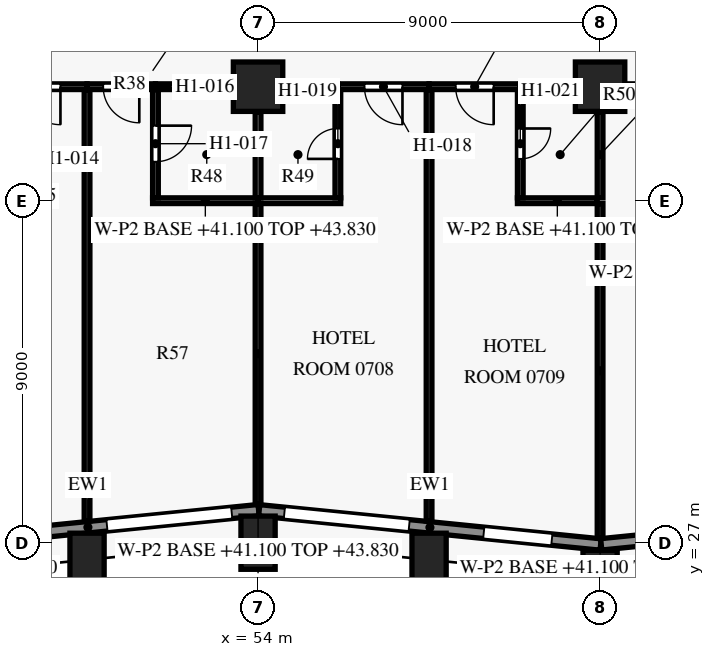
"""IFC4 building model, lengths in metres.
Left out: names, types, materials, properties, quantities, classifications, styles, units other than length and angle.
Written with IfcOpenShell. Run it as: python <this file> out.ifc"""

import sys

from ifc_helpers import new_model, si_unit, direction, frame, frame_2d, origin, origin_2d, place, context, subcontext, project, spatial, rectangle, extrude, element, fill, save


model = new_model("IFC4")
c1 = context("Model", 3, precision=1e-05, world=origin(), true_north=direction((0.0, 1.0)))
c2 = subcontext(c1, "Body", "Model", "MODEL_VIEW")
j1 = project(units=[si_unit("LENGTHUNIT", "METRE"), si_unit("PLANEANGLEUNIT", "RADIAN")], contexts=[c1])
p1 = place(None, origin())
s1 = spatial("IfcSite", under=j1, at=p1, CompositionType="ELEMENT")
p2 = place(p1, origin())
s2 = spatial("IfcBuilding", under=s1, at=p2, CompositionType="ELEMENT")
p3 = place(p2, frame((0.0, 0.0, 41.1)))
s3 = spatial("IfcBuildingStorey", under=s2, at=p3, CompositionType="ELEMENT", Elevation=41.1)
for number, where, z_axis, x_axis in (
    (1, (49.5, 26.55, 0.0), (0.0, 0.0, 1.0), (0.995, 0.1, 0.0)),
    (2, (54.0, 27.0, 0.0), (0.0, 0.0, 1.0), (1.0, 0.0, 0.0)),
    (3, (58.5, 26.55, 0.0), (0.0, 0.0, 1.0), (0.995, -0.1, 0.0)),
    (4, (63.0, 26.1, 0.0), (0.0, 0.0, 1.0), (1.0, 0.0, 0.0)),
):
    element("IfcColumn", number, at=place(p3, frame(where, z_axis=z_axis, x_axis=x_axis)), inside=s3, PredefinedType="COLUMN", context=c2, shape_type="SweptSolid", body=[
        extrude(rectangle(XDim=0.9, YDim=1.4, at=origin_2d()), origin(), (0.0, 0.0, 1.0), 3.6),
    ])
for number, where, z_axis, x_axis in (
    (5, (54.0, 39.0, 0.0), (0.0, 0.0, 1.0), (1.0, 0.0, 0.0)),
    (6, (63.0, 39.0, 0.0), (0.0, 0.0, 1.0), (1.0, 0.0, 0.0)),
):
    element("IfcColumn", number, at=place(p3, frame(where, z_axis=z_axis, x_axis=x_axis)), inside=s3, PredefinedType="COLUMN", context=c2, shape_type="SweptSolid", body=[
        extrude(rectangle(XDim=1.3, YDim=1.3, at=origin_2d()), origin(), (0.0, 0.0, 1.0), 3.6),
    ])
p4 = place(p3, frame((54.015, 27.856, 0.0), z_axis=(0.0, 0.0, 1.0), x_axis=(-0.995037993253, -0.099495688264, 0.0)))
e7 = element("IfcWall", 7, at=p4, inside=s3, PredefinedType="SOLIDWALL", context=c2, shape_type="SweptSolid", body=[
    extrude(rectangle(XDim=9.03, YDim=0.3, at=frame_2d((4.515, 0.0))), origin(), (0.0, 0.0, 1.0), 2.95),
])
p5 = place(p4, frame((0.711, 0.0, 0.15)))
e8 = element("IfcOpeningElement", 8, at=p5, cuts=e7, PredefinedType="OPENING", context=c2, shape_type="SweptSolid", body=[
    extrude(rectangle(XDim=3.3, YDim=2.4, at=frame_2d((1.65, 1.2))), frame((0.0, 0.16, 0.0), z_axis=(0.0, -1.0, 0.0), x_axis=(1.0, 0.0, 0.0)), (0.0, 0.0, 1.0), 0.32),
])
p6 = place(p4, frame((5.984, 0.0, 0.75)))
e9 = element("IfcOpeningElement", 9, at=p6, cuts=e7, PredefinedType="OPENING", context=c2, shape_type="SweptSolid", body=[
    extrude(rectangle(XDim=1.8, YDim=1.8, at=frame_2d((0.9, 0.9))), frame((0.0, 0.16, 0.0), z_axis=(0.0, -1.0, 0.0), x_axis=(1.0, 0.0, 0.0)), (0.0, 0.0, 1.0), 0.32),
])
p7 = place(p3, frame((63.015, 26.953, 0.0), z_axis=(0.0, 0.0, 1.0), x_axis=(-0.995035316196, 0.099522457379, 0.0)))
e10 = element("IfcWall", 10, at=p7, inside=s3, PredefinedType="SOLIDWALL", context=c2, shape_type="SweptSolid", body=[
    extrude(rectangle(XDim=9.03, YDim=0.3, at=frame_2d((4.515, 0.0))), origin(), (0.0, 0.0, 1.0), 2.95),
])
p8 = place(p7, frame((1.291, 0.0, 0.75)))
e11 = element("IfcOpeningElement", 11, at=p8, cuts=e10, PredefinedType="OPENING", context=c2, shape_type="SweptSolid", body=[
    extrude(rectangle(XDim=1.8, YDim=1.8, at=frame_2d((0.9, 0.9))), frame((0.0, 0.16, 0.0), z_axis=(0.0, -1.0, 0.0), x_axis=(1.0, 0.0, 0.0)), (0.0, 0.0, 1.0), 0.32),
])
p9 = place(p7, frame((5.064, 0.0, 0.15)))
e12 = element("IfcOpeningElement", 12, at=p9, cuts=e10, PredefinedType="OPENING", context=c2, shape_type="SweptSolid", body=[
    extrude(rectangle(XDim=3.3, YDim=2.4, at=frame_2d((1.65, 1.2))), frame((0.0, 0.16, 0.0), z_axis=(0.0, -1.0, 0.0), x_axis=(1.0, 0.0, 0.0)), (0.0, 0.0, 1.0), 0.32),
])
p10 = place(p3, frame((66.785, 27.333, 0.0), z_axis=(0.0, 0.0, 1.0), x_axis=(-0.995038471088, -0.099490909409, 0.0)))
e13 = element("IfcWall", 13, at=p10, inside=s3, PredefinedType="SOLIDWALL", context=c2, shape_type="SweptSolid", body=[
    extrude(rectangle(XDim=3.774, YDim=0.3, at=frame_2d((1.887, 0.0))), origin(), (0.0, 0.0, 1.0), 2.95),
])
p11 = place(p10, frame((0.728, 0.0, 0.75)))
e14 = element("IfcOpeningElement", 14, at=p11, cuts=e13, PredefinedType="OPENING", context=c2, shape_type="SweptSolid", body=[
    extrude(rectangle(XDim=1.8, YDim=1.8, at=frame_2d((0.9, 0.9))), frame((0.0, 0.16, 0.0), z_axis=(0.0, -1.0, 0.0), x_axis=(1.0, 0.0, 0.0)), (0.0, 0.0, 1.0), 0.32),
])
p12 = place(p3, frame((54.0, 35.925, 0.0), z_axis=(0.0, 0.0, 1.0), x_axis=(0.0, -1.0, 0.0)))
e15 = element("IfcWall", 15, at=p12, inside=s3, PredefinedType="PARTITIONING", context=c2, shape_type="SweptSolid", body=[
    extrude(rectangle(XDim=7.9, YDim=0.15, at=frame_2d((3.95, 0.0))), origin(), (0.0, 0.0, 1.0), 2.73),
])
p13 = place(p3, frame((63.0, 35.925, 0.0), z_axis=(0.0, 0.0, 1.0), x_axis=(0.0, -1.0, 0.0)))
e16 = element("IfcWall", 16, at=p13, inside=s3, PredefinedType="PARTITIONING", context=c2, shape_type="SweptSolid", body=[
    extrude(rectangle(XDim=8.8, YDim=0.15, at=frame_2d((4.4, 0.0))), origin(), (0.0, 0.0, 1.0), 2.73),
])
p14 = place(p3, frame((51.225, 36.0, 0.0), z_axis=(0.0, 0.0, 1.0), x_axis=(1.0, 0.0, 0.0)))
e17 = element("IfcWall", 17, at=p14, inside=s3, PredefinedType="PARTITIONING", context=c2, shape_type="SweptSolid", body=[
    extrude(rectangle(XDim=2.775, YDim=0.15, at=frame_2d((1.387, 0.0))), origin(), (0.0, 0.0, 1.0), 2.73),
])
p15 = place(p3, frame((54.0, 36.0, 0.0), z_axis=(0.0, 0.0, 1.0), x_axis=(1.0, 0.0, 0.0)))
e18 = element("IfcWall", 18, at=p15, inside=s3, PredefinedType="PARTITIONING", context=c2, shape_type="SweptSolid", body=[
    extrude(rectangle(XDim=2.175, YDim=0.15, at=frame_2d((1.087, 0.0))), origin(), (0.0, 0.0, 1.0), 2.73),
])
p16 = place(p3, frame((60.825, 36.0, 0.0), z_axis=(0.0, 0.0, 1.0), x_axis=(1.0, 0.0, 0.0)))
e19 = element("IfcWall", 19, at=p16, inside=s3, PredefinedType="PARTITIONING", context=c2, shape_type="SweptSolid", body=[
    extrude(rectangle(XDim=2.1, YDim=0.15, at=frame_2d((1.05, 0.0))), origin(), (0.0, 0.0, 1.0), 2.73),
])
p17 = place(p3, frame((56.1, 36.075, 0.0), z_axis=(0.0, 0.0, 1.0), x_axis=(0.0, 1.0, 0.0)))
e20 = element("IfcWall", 20, at=p17, inside=s3, PredefinedType="PARTITIONING", context=c2, shape_type="SweptSolid", body=[
    extrude(rectangle(XDim=2.85, YDim=0.15, at=frame_2d((1.425, 0.0))), origin(), (0.0, 0.0, 1.0), 2.58),
])
p18 = place(p17, frame((1.025, 0.0, 0.0)))
e21 = element("IfcOpeningElement", 21, at=p18, cuts=e20, PredefinedType="OPENING", context=c2, shape_type="SweptSolid", body=[
    extrude(rectangle(XDim=0.8, YDim=2.1, at=frame_2d((0.4, 1.05))), frame((0.0, 0.085, 0.0), z_axis=(0.0, -1.0, 0.0), x_axis=(1.0, 0.0, 0.0)), (0.0, 0.0, 1.0), 0.17),
])
for number, where, z_axis, x_axis in (
    (22, (54.0, 38.345, 0.0), (0.0, 0.0, 1.0), (0.0, -1.0, 0.0)),
    (23, (63.0, 38.345, 0.0), (0.0, 0.0, 1.0), (0.0, -1.0, 0.0)),
):
    element("IfcWall", number, at=place(p3, frame(where, z_axis=z_axis, x_axis=x_axis)), inside=s3, PredefinedType="PARTITIONING", context=c2, shape_type="SweptSolid", body=[
        extrude(rectangle(XDim=2.27, YDim=0.15, at=frame_2d((1.135, 0.0))), origin(), (0.0, 0.0, 1.0), 2.73),
    ])
p19 = place(p3, frame((49.5, 38.925, 0.0), z_axis=(0.0, 0.0, 1.0), x_axis=(0.0, -1.0, 0.0)))
e24 = element("IfcWall", 24, at=p19, inside=s3, PredefinedType="PARTITIONING", context=c2, shape_type="SweptSolid", body=[
    extrude(rectangle(XDim=11.35, YDim=0.15, at=frame_2d((5.675, 0.0))), origin(), (0.0, 0.0, 1.0), 2.58),
])
p20 = place(p3, frame((51.3, 38.925, 0.0), z_axis=(0.0, 0.0, 1.0), x_axis=(0.0, -1.0, 0.0)))
e25 = element("IfcWall", 25, at=p20, inside=s3, PredefinedType="PARTITIONING", context=c2, shape_type="SweptSolid", body=[
    extrude(rectangle(XDim=2.85, YDim=0.15, at=frame_2d((1.425, 0.0))), origin(), (0.0, 0.0, 1.0), 2.58),
])
p21 = place(p20, frame((0.95, 0.0, 0.0)))
e26 = element("IfcOpeningElement", 26, at=p21, cuts=e25, PredefinedType="OPENING", context=c2, shape_type="SweptSolid", body=[
    extrude(rectangle(XDim=0.95, YDim=2.1, at=frame_2d((0.475, 1.05))), frame((0.0, 0.085, 0.0), z_axis=(0.0, -1.0, 0.0), x_axis=(1.0, 0.0, 0.0)), (0.0, 0.0, 1.0), 0.17),
])
p22 = place(p3, frame((58.5, 38.925, 0.0), z_axis=(0.0, 0.0, 1.0), x_axis=(0.0, -1.0, 0.0)))
e27 = element("IfcWall", 27, at=p22, inside=s3, PredefinedType="PARTITIONING", context=c2, shape_type="SweptSolid", body=[
    extrude(rectangle(XDim=11.35, YDim=0.15, at=frame_2d((5.675, 0.0))), origin(), (0.0, 0.0, 1.0), 2.58),
])
p23 = place(p3, frame((60.9, 38.925, 0.0), z_axis=(0.0, 0.0, 1.0), x_axis=(0.0, -1.0, 0.0)))
e28 = element("IfcWall", 28, at=p23, inside=s3, PredefinedType="PARTITIONING", context=c2, shape_type="SweptSolid", body=[
    extrude(rectangle(XDim=2.85, YDim=0.15, at=frame_2d((1.425, 0.0))), origin(), (0.0, 0.0, 1.0), 2.58),
])
p24 = place(p23, frame((1.025, 0.0, 0.0)))
e29 = element("IfcOpeningElement", 29, at=p24, cuts=e28, PredefinedType="OPENING", context=c2, shape_type="SweptSolid", body=[
    extrude(rectangle(XDim=0.8, YDim=2.1, at=frame_2d((0.4, 1.05))), frame((0.0, 0.085, 0.0), z_axis=(0.0, -1.0, 0.0), x_axis=(1.0, 0.0, 0.0)), (0.0, 0.0, 1.0), 0.17),
])
p25 = place(p3, frame((49.5, 39.0, 0.0), z_axis=(0.0, 0.0, 1.0), x_axis=(-1.0, 0.0, 0.0)))
e30 = element("IfcWall", 30, at=p25, inside=s3, PredefinedType="PARTITIONING", context=c2, shape_type="SweptSolid", body=[
    extrude(rectangle(XDim=2.4, YDim=0.15, at=frame_2d((1.2, 0.0))), origin(), (0.0, 0.0, 1.0), 2.58),
])
p26 = place(p25, frame((0.7, 0.0, 0.0)))
e31 = element("IfcOpeningElement", 31, at=p26, cuts=e30, PredefinedType="OPENING", context=c2, shape_type="SweptSolid", body=[
    extrude(rectangle(XDim=1.0, YDim=2.1, at=frame_2d((0.5, 1.05))), frame((0.0, 0.085, 0.0), z_axis=(0.0, -1.0, 0.0), x_axis=(1.0, 0.0, 0.0)), (0.0, 0.0, 1.0), 0.17),
])
p27 = place(p3, frame((51.3, 39.0, 0.0), z_axis=(0.0, 0.0, 1.0), x_axis=(-1.0, 0.0, 0.0)))
e32 = element("IfcWall", 32, at=p27, inside=s3, PredefinedType="PARTITIONING", context=c2, shape_type="SweptSolid", body=[
    extrude(rectangle(XDim=1.8, YDim=0.15, at=frame_2d((0.9, 0.0))), origin(), (0.0, 0.0, 1.0), 2.58),
])
p28 = place(p27, frame((0.425, 0.0, 0.0)))
e33 = element("IfcOpeningElement", 33, at=p28, cuts=e32, PredefinedType="OPENING", context=c2, shape_type="SweptSolid", body=[
    extrude(rectangle(XDim=0.95, YDim=2.1, at=frame_2d((0.475, 1.05))), frame((0.0, 0.085, 0.0), z_axis=(0.0, -1.0, 0.0), x_axis=(1.0, 0.0, 0.0)), (0.0, 0.0, 1.0), 0.17),
])
p29 = place(p3, frame((53.345, 39.0, 0.0), z_axis=(0.0, 0.0, 1.0), x_axis=(-1.0, 0.0, 0.0)))
e34 = element("IfcWall", 34, at=p29, inside=s3, PredefinedType="PARTITIONING", context=c2, shape_type="SweptSolid", body=[
    extrude(rectangle(XDim=2.045, YDim=0.15, at=frame_2d((1.022, 0.0))), origin(), (0.0, 0.0, 1.0), 2.58),
])
p30 = place(p3, frame((56.1, 39.0, 0.0), z_axis=(0.0, 0.0, 1.0), x_axis=(-1.0, 0.0, 0.0)))
e35 = element("IfcWall", 35, at=p30, inside=s3, PredefinedType="PARTITIONING", context=c2, shape_type="SweptSolid", body=[
    extrude(rectangle(XDim=1.445, YDim=0.15, at=frame_2d((0.723, 0.0))), origin(), (0.0, 0.0, 1.0), 2.58),
])
p31 = place(p3, frame((58.5, 39.0, 0.0), z_axis=(0.0, 0.0, 1.0), x_axis=(-1.0, 0.0, 0.0)))
e36 = element("IfcWall", 36, at=p31, inside=s3, PredefinedType="PARTITIONING", context=c2, shape_type="SweptSolid", body=[
    extrude(rectangle(XDim=2.4, YDim=0.15, at=frame_2d((1.2, 0.0))), origin(), (0.0, 0.0, 1.0), 2.58),
])
p32 = place(p31, frame((0.7, 0.0, 0.0)))
e37 = element("IfcOpeningElement", 37, at=p32, cuts=e36, PredefinedType="OPENING", context=c2, shape_type="SweptSolid", body=[
    extrude(rectangle(XDim=1.0, YDim=2.1, at=frame_2d((0.5, 1.05))), frame((0.0, 0.085, 0.0), z_axis=(0.0, -1.0, 0.0), x_axis=(1.0, 0.0, 0.0)), (0.0, 0.0, 1.0), 0.17),
])
p33 = place(p3, frame((60.9, 39.0, 0.0), z_axis=(0.0, 0.0, 1.0), x_axis=(-1.0, 0.0, 0.0)))
e38 = element("IfcWall", 38, at=p33, inside=s3, PredefinedType="PARTITIONING", context=c2, shape_type="SweptSolid", body=[
    extrude(rectangle(XDim=2.4, YDim=0.15, at=frame_2d((1.2, 0.0))), origin(), (0.0, 0.0, 1.0), 2.58),
])
p34 = place(p33, frame((0.7, 0.0, 0.0)))
e39 = element("IfcOpeningElement", 39, at=p34, cuts=e38, PredefinedType="OPENING", context=c2, shape_type="SweptSolid", body=[
    extrude(rectangle(XDim=1.0, YDim=2.1, at=frame_2d((0.5, 1.05))), frame((0.0, 0.085, 0.0), z_axis=(0.0, -1.0, 0.0), x_axis=(1.0, 0.0, 0.0)), (0.0, 0.0, 1.0), 0.17),
])
p35 = place(p3, frame((62.345, 39.0, 0.0), z_axis=(0.0, 0.0, 1.0), x_axis=(-1.0, 0.0, 0.0)))
e40 = element("IfcWall", 40, at=p35, inside=s3, PredefinedType="PARTITIONING", context=c2, shape_type="SweptSolid", body=[
    extrude(rectangle(XDim=1.445, YDim=0.15, at=frame_2d((0.723, 0.0))), origin(), (0.0, 0.0, 1.0), 2.58),
])
p36 = place(p3, frame((64.875, 39.0, 0.0), z_axis=(0.0, 0.0, 1.0), x_axis=(-1.0, 0.0, 0.0)))
e41 = element("IfcWall", 41, at=p36, inside=s3, PredefinedType="PARTITIONING", context=c2, shape_type="SweptSolid", body=[
    extrude(rectangle(XDim=1.22, YDim=0.15, at=frame_2d((0.61, 0.0))), origin(), (0.0, 0.0, 1.0), 2.58),
])
p37 = place(p5, origin())
e42 = element("IfcWindow", 42, at=p37, inside=s3, PartitioningType="SINGLE_PANEL", PredefinedType="WINDOW", context=c2, shape_type="SweptSolid", body=[
    extrude(rectangle(XDim=3.3, YDim=2.4, at=frame_2d((1.65, 1.2))), frame((0.0, 0.03, 0.0), z_axis=(0.0, -1.0, 0.0), x_axis=(1.0, 0.0, 0.0)), (0.0, 0.0, 1.0), 0.06),
])
fill(e8, e42)
p38 = place(p8, origin())
e43 = element("IfcWindow", 43, at=p38, inside=s3, PartitioningType="SINGLE_PANEL", PredefinedType="WINDOW", context=c2, shape_type="SweptSolid", body=[
    extrude(rectangle(XDim=1.8, YDim=1.8, at=frame_2d((0.9, 0.9))), frame((0.0, 0.03, 0.0), z_axis=(0.0, -1.0, 0.0), x_axis=(1.0, 0.0, 0.0)), (0.0, 0.0, 1.0), 0.06),
])
fill(e11, e43)
p39 = place(p9, origin())
e44 = element("IfcWindow", 44, at=p39, inside=s3, PartitioningType="SINGLE_PANEL", PredefinedType="WINDOW", context=c2, shape_type="SweptSolid", body=[
    extrude(rectangle(XDim=3.3, YDim=2.4, at=frame_2d((1.65, 1.2))), frame((0.0, 0.03, 0.0), z_axis=(0.0, -1.0, 0.0), x_axis=(1.0, 0.0, 0.0)), (0.0, 0.0, 1.0), 0.06),
])
fill(e12, e44)
p40 = place(p26, origin())
e45 = element("IfcDoor", 45, at=p40, inside=s3, OperationType="SINGLE_SWING_LEFT", PredefinedType="DOOR", context=c2, shape_type="SweptSolid", body=[
    extrude(rectangle(XDim=1.0, YDim=2.1, at=frame_2d((0.5, 1.05))), frame((0.0, 0.025, 0.0), z_axis=(0.0, -1.0, 0.0), x_axis=(1.0, 0.0, 0.0)), (0.0, 0.0, 1.0), 0.05),
])
fill(e31, e45)
p41 = place(p28, origin())
e46 = element("IfcDoor", 46, at=p41, inside=s3, OperationType="SINGLE_SWING_LEFT", PredefinedType="DOOR", context=c2, shape_type="SweptSolid", body=[
    extrude(rectangle(XDim=0.95, YDim=2.1, at=frame_2d((0.475, 1.05))), frame((0.0, 0.025, 0.0), z_axis=(0.0, -1.0, 0.0), x_axis=(1.0, 0.0, 0.0)), (0.0, 0.0, 1.0), 0.05),
])
fill(e33, e46)
p42 = place(p21, origin())
e47 = element("IfcDoor", 47, at=p42, inside=s3, OperationType="SINGLE_SWING_LEFT", PredefinedType="DOOR", context=c2, shape_type="SweptSolid", body=[
    extrude(rectangle(XDim=0.95, YDim=2.1, at=frame_2d((0.475, 1.05))), frame((0.0, 0.025, 0.0), z_axis=(0.0, -1.0, 0.0), x_axis=(1.0, 0.0, 0.0)), (0.0, 0.0, 1.0), 0.05),
])
fill(e26, e47)
p43 = place(p32, origin())
e48 = element("IfcDoor", 48, at=p43, inside=s3, OperationType="SINGLE_SWING_LEFT", PredefinedType="DOOR", context=c2, shape_type="SweptSolid", body=[
    extrude(rectangle(XDim=1.0, YDim=2.1, at=frame_2d((0.5, 1.05))), frame((0.0, 0.025, 0.0), z_axis=(0.0, -1.0, 0.0), x_axis=(1.0, 0.0, 0.0)), (0.0, 0.0, 1.0), 0.05),
])
fill(e37, e48)
p44 = place(p18, origin())
e49 = element("IfcDoor", 49, at=p44, inside=s3, OperationType="SINGLE_SWING_LEFT", PredefinedType="DOOR", context=c2, shape_type="SweptSolid", body=[
    extrude(rectangle(XDim=0.8, YDim=2.1, at=frame_2d((0.4, 1.05))), frame((0.0, 0.025, 0.0), z_axis=(0.0, -1.0, 0.0), x_axis=(1.0, 0.0, 0.0)), (0.0, 0.0, 1.0), 0.05),
])
fill(e21, e49)
p45 = place(p34, origin())
e50 = element("IfcDoor", 50, at=p45, inside=s3, OperationType="SINGLE_SWING_LEFT", PredefinedType="DOOR", context=c2, shape_type="SweptSolid", body=[
    extrude(rectangle(XDim=1.0, YDim=2.1, at=frame_2d((0.5, 1.05))), frame((0.0, 0.025, 0.0), z_axis=(0.0, -1.0, 0.0), x_axis=(1.0, 0.0, 0.0)), (0.0, 0.0, 1.0), 0.05),
])
fill(e39, e50)
p46 = place(p24, origin())
e51 = element("IfcDoor", 51, at=p46, inside=s3, OperationType="SINGLE_SWING_LEFT", PredefinedType="DOOR", context=c2, shape_type="SweptSolid", body=[
    extrude(rectangle(XDim=0.8, YDim=2.1, at=frame_2d((0.4, 1.05))), frame((0.0, 0.025, 0.0), z_axis=(0.0, -1.0, 0.0), x_axis=(1.0, 0.0, 0.0)), (0.0, 0.0, 1.0), 0.05),
])
fill(e29, e51)
save(model, sys.argv[1])
